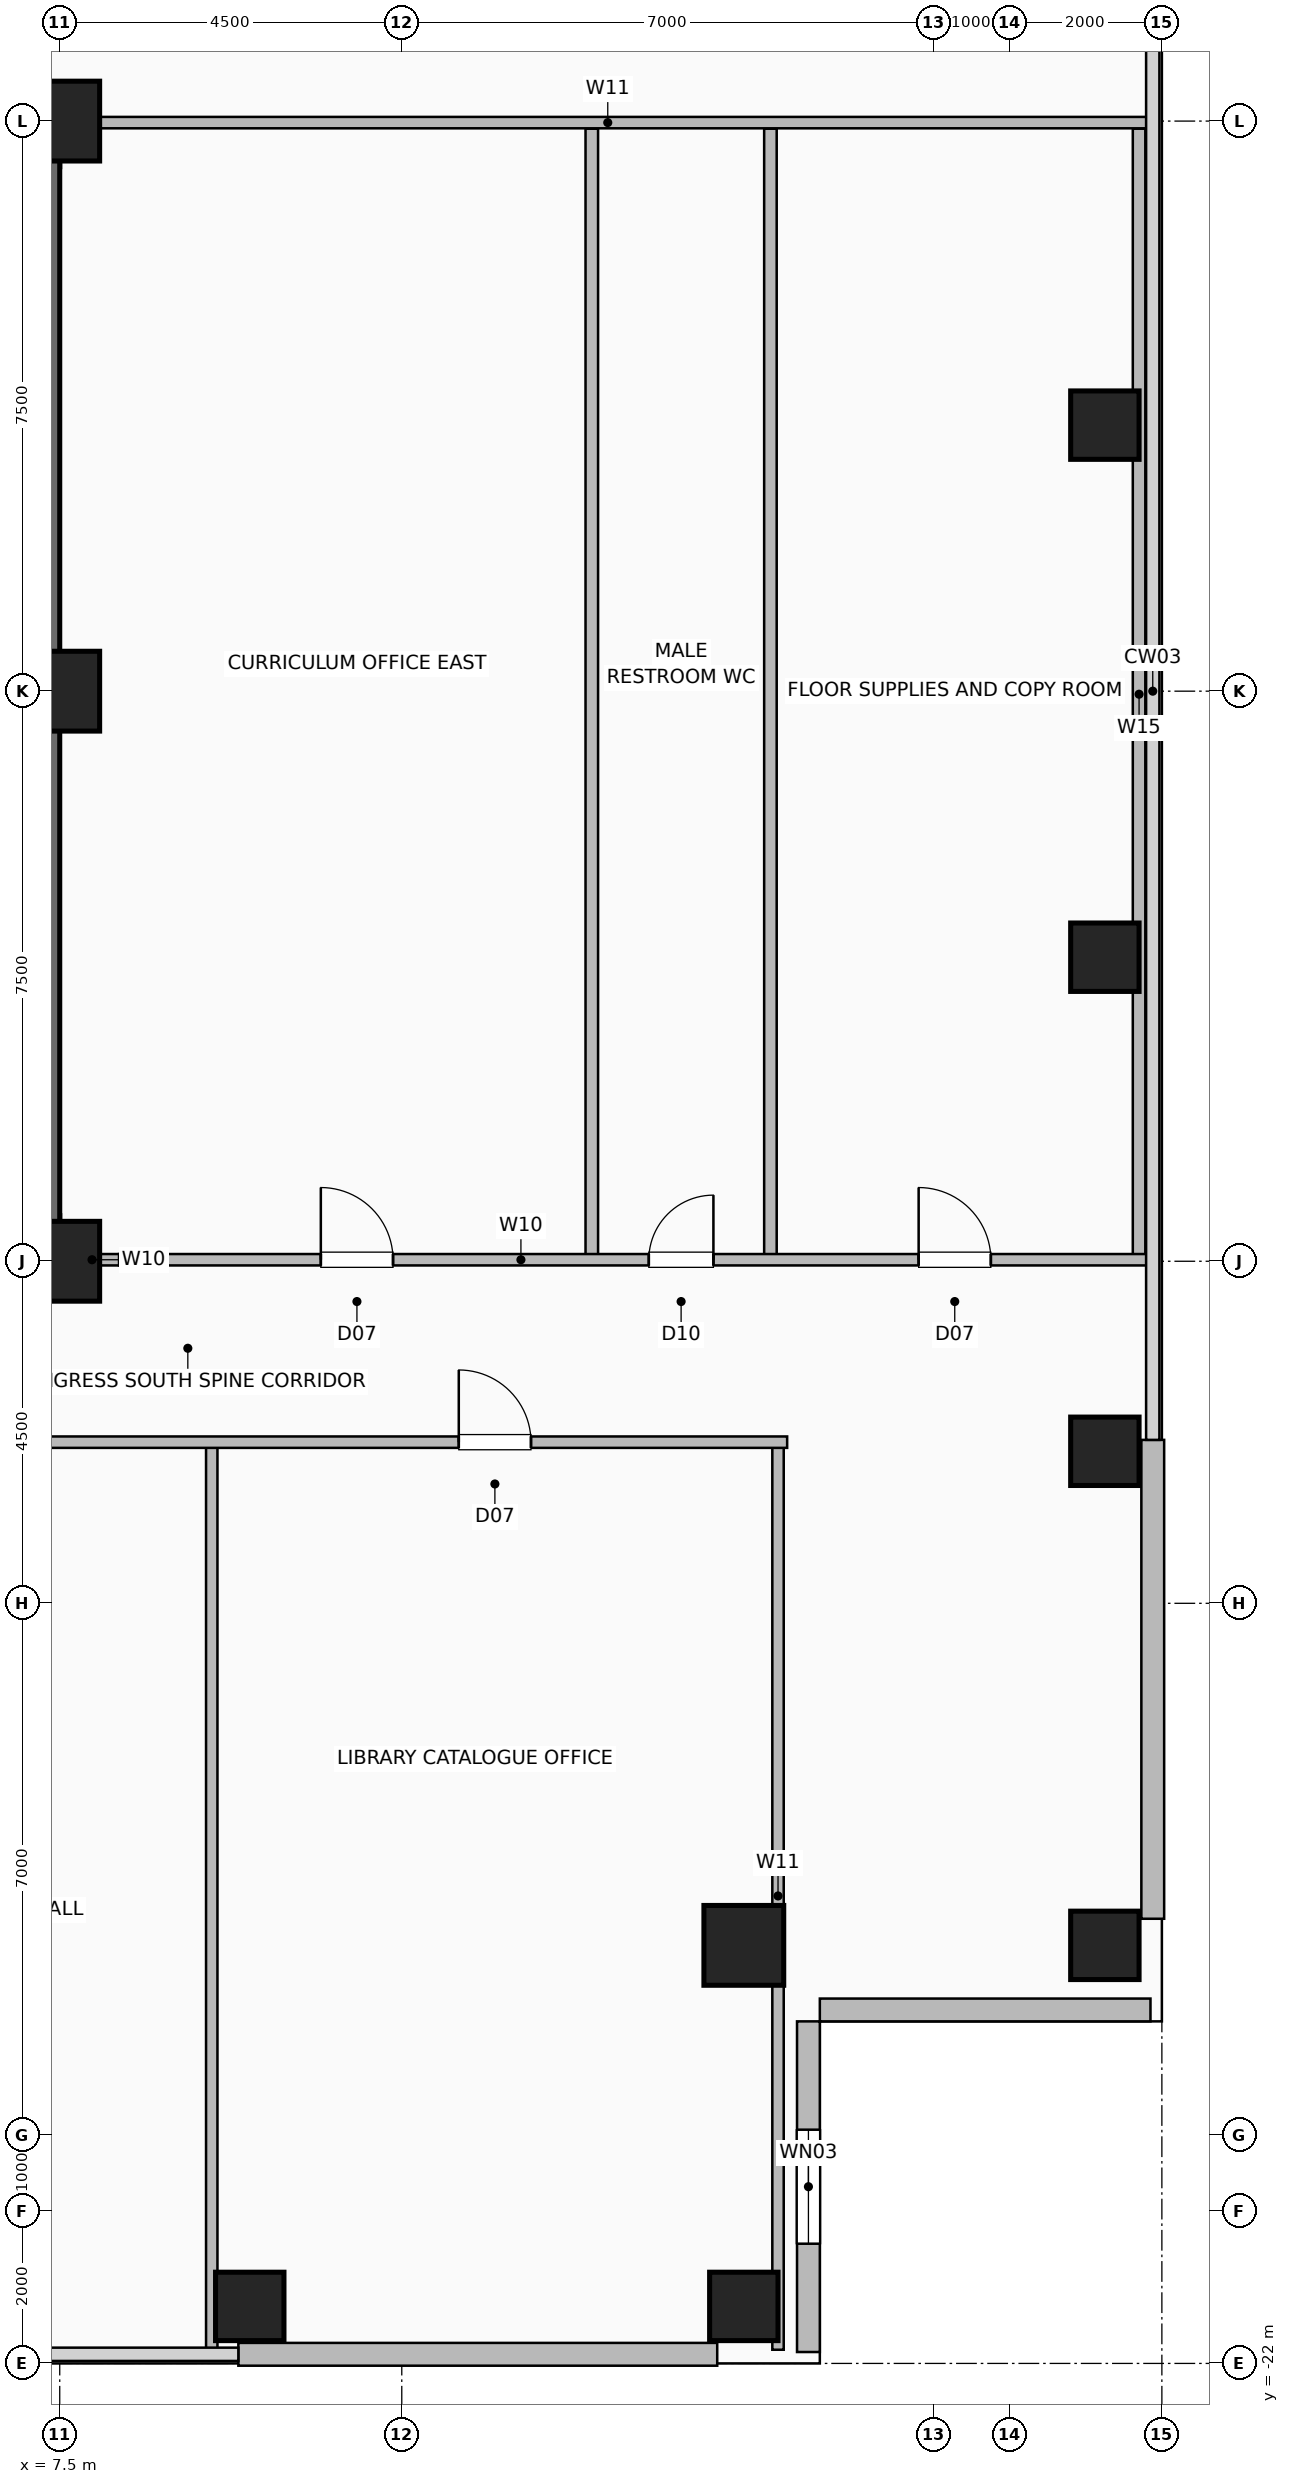
"""IFC4 building model, lengths in metres.
Left out: names, types, materials, properties, quantities, classifications, styles, units other than length and angle.
Written with IfcOpenShell. Run it as: python <this file> out.ifc"""

import sys

from ifc_helpers import new_model, si_unit, direction, frame, frame_2d, origin, origin_2d, place, context, subcontext, project, spatial, rectangle, hollow_rectangle, extrude, element, fill, save


model = new_model("IFC4")
c1 = context("Model", 3, precision=1e-05, world=origin(), true_north=direction((0.0, 1.0)))
c2 = subcontext(c1, "Body", "Model", "MODEL_VIEW")
j1 = project(units=[si_unit("LENGTHUNIT", "METRE"), si_unit("PLANEANGLEUNIT", "RADIAN")], contexts=[c1])
p1 = place(None, origin())
s1 = spatial("IfcSite", under=j1, at=p1, CompositionType="ELEMENT")
p2 = place(p1, origin())
s2 = spatial("IfcBuilding", under=s1, at=p2, CompositionType="ELEMENT")
p3 = place(p2, frame((0.0, 0.0, 133.6)))
s3 = spatial("IfcBuildingStorey", under=s2, at=p3, CompositionType="ELEMENT", Elevation=133.6)
for number, where, z_axis, x_axis in (
    (1, (7.5, -7.5, 0.0), (0.0, 0.0, 1.0), (1.0, 0.0, 0.0)),
    (2, (7.5, 0.0, 0.0), (0.0, 0.0, 1.0), (1.0, 0.0, 0.0)),
    (3, (7.5, 7.5, 0.0), (0.0, 0.0, 1.0), (1.0, 0.0, 0.0)),
):
    element("IfcColumn", number, at=place(p3, frame(where, z_axis=z_axis, x_axis=x_axis)), inside=s3, PredefinedType="COLUMN", context=c2, shape_type="SweptSolid", body=[
        extrude(hollow_rectangle(XDim=1.05, YDim=1.05, WallThickness=0.05, at=origin_2d()), origin(), (0.0, 0.0, 1.0), 3.6),
    ])
for number, where, z_axis, x_axis in (
    (4, (21.25, -16.5, 0.0), (0.0, 0.0, 1.0), (1.0, 0.0, 0.0)),
    (5, (21.25, -10.0, 0.0), (0.0, 0.0, 1.0), (1.0, 0.0, 0.0)),
    (6, (21.25, -3.5, 0.0), (0.0, 0.0, 1.0), (1.0, 0.0, 0.0)),
    (7, (21.25, 3.5, 0.0), (0.0, 0.0, 1.0), (1.0, 0.0, 0.0)),
    (8, (10.0, -21.25, 0.0), (0.0, 0.0, 1.0), (1.0, 0.0, 0.0)),
    (9, (16.5, -21.25, 0.0), (0.0, 0.0, 1.0), (1.0, 0.0, 0.0)),
):
    element("IfcColumn", number, at=place(p3, frame(where, z_axis=z_axis, x_axis=x_axis)), inside=s3, PredefinedType="COLUMN", context=c2, shape_type="SweptSolid", body=[
        extrude(hollow_rectangle(XDim=0.9, YDim=0.9, WallThickness=0.045, at=origin_2d()), origin(), (0.0, 0.0, 1.0), 3.6),
    ])
p4 = place(p3, frame((16.5, -16.5, 0.0), z_axis=(0.0, 0.0, 1.0), x_axis=(1.0, 0.0, 0.0)))
e10 = element("IfcColumn", 10, at=p4, inside=s3, PredefinedType="COLUMN", context=c2, shape_type="SweptSolid", body=[
    extrude(hollow_rectangle(XDim=1.05, YDim=1.05, WallThickness=0.05, at=origin_2d()), origin(), (0.0, 0.0, 1.0), 3.6),
])
for number, where, z_axis, x_axis in (
    (11, (9.85, -21.88, 0.0), (0.0, 0.0, 1.0), (1.0, 0.0, 0.0)),
    (12, (21.88, -16.15, 0.0), (0.0, 0.0, 1.0), (0.0, 1.0, 0.0)),
):
    element("IfcWall", number, at=place(p3, frame(where, z_axis=z_axis, x_axis=x_axis)), inside=s3, PredefinedType="SOLIDWALL", context=c2, shape_type="SweptSolid", body=[
        extrude(rectangle(XDim=6.3, YDim=0.3, at=frame_2d((3.15, 0.0))), origin(), (0.0, 0.0, 1.0), 3.36),
    ])
p5 = place(p3, frame((17.35, -21.85, 0.0), z_axis=(0.0, 0.0, 1.0), x_axis=(0.0, 1.0, 0.0)))
e13 = element("IfcWall", 13, at=p5, inside=s3, PredefinedType="SOLIDWALL", context=c2, shape_type="SweptSolid", body=[
    extrude(rectangle(XDim=4.35, YDim=0.3, at=frame_2d((2.175, 0.0))), origin(), (0.0, 0.0, 1.0), 3.36),
])
p6 = place(p5, frame((1.425, 0.0, 0.9)))
e14 = element("IfcOpeningElement", 14, at=p6, cuts=e13, PredefinedType="OPENING", context=c2, shape_type="SweptSolid", body=[
    extrude(rectangle(XDim=1.5, YDim=1.8, at=frame_2d((0.75, 0.9))), frame((0.0, 0.16, 0.0), z_axis=(0.0, -1.0, 0.0), x_axis=(1.0, 0.0, 0.0)), (0.0, 0.0, 1.0), 0.32),
])
p7 = place(p3, frame((21.85, -17.35, 0.0), z_axis=(0.0, 0.0, 1.0), x_axis=(-1.0, 0.0, 0.0)))
e15 = element("IfcWall", 15, at=p7, inside=s3, PredefinedType="SOLIDWALL", context=c2, shape_type="SweptSolid", body=[
    extrude(rectangle(XDim=4.35, YDim=0.3, at=frame_2d((2.175, 0.0))), origin(), (0.0, 0.0, 1.0), 3.36),
])
p8 = place(p3, frame((-7.5, -7.2, 0.0), z_axis=(0.0, 0.0, 1.0), x_axis=(1.0, 0.0, 0.0)))
e16 = element("IfcWall", 16, at=p8, inside=s3, PredefinedType="SHEAR", context=c2, shape_type="SweptSolid", body=[
    extrude(rectangle(XDim=15.0, YDim=0.6, at=frame_2d((7.5, 0.0))), origin(), (0.0, 0.0, 1.0), 3.36),
])
p9 = place(p8, frame((1.55, 0.0, 0.0)))
e17 = element("IfcOpeningElement", 17, at=p9, cuts=e16, PredefinedType="OPENING", context=c2, shape_type="SweptSolid", body=[
    extrude(rectangle(XDim=1.05, YDim=2.08, at=frame_2d((0.525, 1.04))), frame((0.0, 0.31, 0.0), z_axis=(0.0, -1.0, 0.0), x_axis=(1.0, 0.0, 0.0)), (0.0, 0.0, 1.0), 0.62),
])
p10 = place(p8, frame((12.4, 0.0, 0.0)))
e18 = element("IfcOpeningElement", 18, at=p10, cuts=e16, PredefinedType="OPENING", context=c2, shape_type="SweptSolid", body=[
    extrude(rectangle(XDim=1.05, YDim=2.08, at=frame_2d((0.525, 1.04))), frame((0.0, 0.31, 0.0), z_axis=(0.0, -1.0, 0.0), x_axis=(1.0, 0.0, 0.0)), (0.0, 0.0, 1.0), 0.62),
])
p11 = place(p8, frame((5.2, 0.0, 0.0)))
e19 = element("IfcOpeningElement", 19, at=p11, cuts=e16, PredefinedType="OPENING", context=c2, shape_type="SweptSolid", body=[
    extrude(rectangle(XDim=1.0, YDim=2.08, at=frame_2d((0.5, 1.04))), frame((0.0, 0.31, 0.0), z_axis=(0.0, -1.0, 0.0), x_axis=(1.0, 0.0, 0.0)), (0.0, 0.0, 1.0), 0.62),
])
p12 = place(p8, frame((8.65, 0.0, 0.0)))
e20 = element("IfcOpeningElement", 20, at=p12, cuts=e16, PredefinedType="OPENING", context=c2, shape_type="SweptSolid", body=[
    extrude(rectangle(XDim=1.0, YDim=2.08, at=frame_2d((0.5, 1.04))), frame((0.0, 0.31, 0.0), z_axis=(0.0, -1.0, 0.0), x_axis=(1.0, 0.0, 0.0)), (0.0, 0.0, 1.0), 0.62),
])
for number, where, z_axis, x_axis in (
    (21, (-7.5, 7.2, 0.0), (0.0, 0.0, 1.0), (1.0, 0.0, 0.0)),
    (22, (7.2, -7.5, 0.0), (0.0, 0.0, 1.0), (0.0, 1.0, 0.0)),
):
    element("IfcWall", number, at=place(p3, frame(where, z_axis=z_axis, x_axis=x_axis)), inside=s3, PredefinedType="SHEAR", context=c2, shape_type="SweptSolid", body=[
        extrude(rectangle(XDim=15.0, YDim=0.6, at=frame_2d((7.5, 0.0))), origin(), (0.0, 0.0, 1.0), 3.36),
    ])
for number, where, z_axis, x_axis in (
    (23, (9.5, -21.82, 0.0), (0.0, 0.0, 1.0), (0.0, 1.0, 0.0)),
    (24, (16.95, -21.82, 0.0), (0.0, 0.0, 1.0), (0.0, 1.0, 0.0)),
):
    element("IfcWall", number, at=place(p3, frame(where, z_axis=z_axis, x_axis=x_axis)), inside=s3, PredefinedType="PARTITIONING", context=c2, shape_type="SweptSolid", body=[
        extrude(rectangle(XDim=11.94, YDim=0.15, at=frame_2d((5.97, 0.0))), origin(), (0.0, 0.0, 1.0), 3.36),
    ])
p13 = place(p3, frame((-17.07, -9.88, 0.0), z_axis=(0.0, 0.0, 1.0), x_axis=(1.0, 0.0, 0.0)))
e25 = element("IfcWall", 25, at=p13, inside=s3, PredefinedType="PARTITIONING", context=c2, shape_type="SweptSolid", body=[
    extrude(rectangle(XDim=34.14, YDim=0.15, at=frame_2d((17.07, 0.0))), origin(), (0.0, 0.0, 1.0), 3.36),
])
p14 = place(p13, frame((3.695, 0.0, 0.0)))
e26 = element("IfcOpeningElement", 26, at=p14, cuts=e25, PredefinedType="OPENING", context=c2, shape_type="SweptSolid", body=[
    extrude(rectangle(XDim=1.8, YDim=2.08, at=frame_2d((0.9, 1.04))), frame((0.0, 0.085, 0.0), z_axis=(0.0, -1.0, 0.0), x_axis=(1.0, 0.0, 0.0)), (0.0, 0.0, 1.0), 0.17),
])
p15 = place(p13, frame((12.92, 0.0, 0.0)))
e27 = element("IfcOpeningElement", 27, at=p15, cuts=e25, PredefinedType="OPENING", context=c2, shape_type="SweptSolid", body=[
    extrude(rectangle(XDim=1.8, YDim=2.08, at=frame_2d((0.9, 1.04))), frame((0.0, 0.085, 0.0), z_axis=(0.0, -1.0, 0.0), x_axis=(1.0, 0.0, 0.0)), (0.0, 0.0, 1.0), 0.17),
])
p16 = place(p13, frame((21.67, 0.0, 0.0)))
e28 = element("IfcOpeningElement", 28, at=p16, cuts=e25, PredefinedType="OPENING", context=c2, shape_type="SweptSolid", body=[
    extrude(rectangle(XDim=1.8, YDim=2.08, at=frame_2d((0.9, 1.04))), frame((0.0, 0.085, 0.0), z_axis=(0.0, -1.0, 0.0), x_axis=(1.0, 0.0, 0.0)), (0.0, 0.0, 1.0), 0.17),
])
p17 = place(p13, frame((29.82, 0.0, 0.0)))
e29 = element("IfcOpeningElement", 29, at=p17, cuts=e25, PredefinedType="OPENING", context=c2, shape_type="SweptSolid", body=[
    extrude(rectangle(XDim=0.95, YDim=2.06, at=frame_2d((0.475, 1.03))), frame((0.0, 0.085, 0.0), z_axis=(0.0, -1.0, 0.0), x_axis=(1.0, 0.0, 0.0)), (0.0, 0.0, 1.0), 0.17),
])
p18 = place(p3, frame((7.45, -7.48, 0.0), z_axis=(0.0, 0.0, 1.0), x_axis=(1.0, 0.0, 0.0)))
e30 = element("IfcWall", 30, at=p18, inside=s3, PredefinedType="PARTITIONING", context=c2, shape_type="SweptSolid", body=[
    extrude(rectangle(XDim=0.95, YDim=0.15, at=frame_2d((0.475, 0.0))), origin(), (0.0, 0.0, 1.0), 3.36),
])
for number, where, z_axis, x_axis in (
    (31, (16.85, -7.48, 0.0), (0.0, 0.0, 1.0), (0.0, 1.0, 0.0)),
    (32, (14.5, -7.48, 0.0), (0.0, 0.0, 1.0), (0.0, 1.0, 0.0)),
    (33, (21.7, -7.48, 0.0), (0.0, 0.0, 1.0), (0.0, 1.0, 0.0)),
):
    element("IfcWall", number, at=place(p3, frame(where, z_axis=z_axis, x_axis=x_axis)), inside=s3, PredefinedType="PLUMBINGWALL", context=c2, shape_type="SweptSolid", body=[
        extrude(rectangle(XDim=14.88, YDim=0.165, at=frame_2d((7.44, 0.0))), origin(), (0.0, 0.0, 1.0), 3.36),
    ])
p19 = place(p3, frame((8.28, -7.48, 0.0), z_axis=(0.0, 0.0, 1.0), x_axis=(1.0, 0.0, 0.0)))
e34 = element("IfcWall", 34, at=p19, inside=s3, PredefinedType="PARTITIONING", context=c2, shape_type="SweptSolid", body=[
    extrude(rectangle(XDim=13.54, YDim=0.15, at=frame_2d((6.77, 0.0))), origin(), (0.0, 0.0, 1.0), 3.36),
])
p20 = place(p19, frame((2.655, 0.0, 0.0)))
e35 = element("IfcOpeningElement", 35, at=p20, cuts=e34, PredefinedType="OPENING", context=c2, shape_type="SweptSolid", body=[
    extrude(rectangle(XDim=0.95, YDim=2.06, at=frame_2d((0.475, 1.03))), frame((0.0, 0.085, 0.0), z_axis=(0.0, -1.0, 0.0), x_axis=(1.0, 0.0, 0.0)), (0.0, 0.0, 1.0), 0.17),
])
p21 = place(p19, frame((6.97, 0.0, 0.0)))
e36 = element("IfcOpeningElement", 36, at=p21, cuts=e34, PredefinedType="OPENING", context=c2, shape_type="SweptSolid", body=[
    extrude(rectangle(XDim=0.85, YDim=2.05, at=frame_2d((0.425, 1.025))), frame((0.0, 0.085, 0.0), z_axis=(0.0, -1.0, 0.0), x_axis=(1.0, 0.0, 0.0)), (0.0, 0.0, 1.0), 0.17),
])
p22 = place(p19, frame((10.52, 0.0, 0.0)))
e37 = element("IfcOpeningElement", 37, at=p22, cuts=e34, PredefinedType="OPENING", context=c2, shape_type="SweptSolid", body=[
    extrude(rectangle(XDim=0.95, YDim=2.06, at=frame_2d((0.475, 1.03))), frame((0.0, 0.085, 0.0), z_axis=(0.0, -1.0, 0.0), x_axis=(1.0, 0.0, 0.0)), (0.0, 0.0, 1.0), 0.17),
])
p23 = place(p3, frame((7.6, 7.48, 0.0), z_axis=(0.0, 0.0, 1.0), x_axis=(1.0, 0.0, 0.0)))
e38 = element("IfcWall", 38, at=p23, inside=s3, PredefinedType="PARTITIONING", context=c2, shape_type="SweptSolid", body=[
    extrude(rectangle(XDim=14.22, YDim=0.15, at=frame_2d((7.11, 0.0))), origin(), (0.0, 0.0, 1.0), 3.36),
])
p24 = place(p6, origin())
e39 = element("IfcWindow", 39, at=p24, inside=s3, PartitioningType="SINGLE_PANEL", PredefinedType="WINDOW", context=c2, shape_type="SweptSolid", body=[
    extrude(rectangle(XDim=1.5, YDim=1.8, at=frame_2d((0.75, 0.9))), frame((0.0, 0.03, 0.0), z_axis=(0.0, -1.0, 0.0), x_axis=(1.0, 0.0, 0.0)), (0.0, 0.0, 1.0), 0.06),
])
fill(e14, e39)
p25 = place(p17, origin())
e40 = element("IfcDoor", 40, at=p25, inside=s3, OperationType="SINGLE_SWING_LEFT", PredefinedType="DOOR", context=c2, shape_type="SweptSolid", body=[
    extrude(rectangle(XDim=0.95, YDim=2.06, at=frame_2d((0.475, 1.03))), frame((0.0, 0.025, 0.0), z_axis=(0.0, -1.0, 0.0), x_axis=(1.0, 0.0, 0.0)), (0.0, 0.0, 1.0), 0.05),
])
fill(e29, e40)
p26 = place(p20, origin())
e41 = element("IfcDoor", 41, at=p26, inside=s3, OperationType="SINGLE_SWING_LEFT", PredefinedType="DOOR", context=c2, shape_type="SweptSolid", body=[
    extrude(rectangle(XDim=0.95, YDim=2.06, at=frame_2d((0.475, 1.03))), frame((0.0, 0.025, 0.0), z_axis=(0.0, -1.0, 0.0), x_axis=(1.0, 0.0, 0.0)), (0.0, 0.0, 1.0), 0.05),
])
fill(e35, e41)
p27 = place(p21, origin())
e42 = element("IfcDoor", 42, at=p27, inside=s3, OperationType="SINGLE_SWING_RIGHT", PredefinedType="DOOR", context=c2, shape_type="SweptSolid", body=[
    extrude(rectangle(XDim=0.85, YDim=2.05, at=frame_2d((0.425, 1.025))), frame((0.0, 0.025, 0.0), z_axis=(0.0, -1.0, 0.0), x_axis=(1.0, 0.0, 0.0)), (0.0, 0.0, 1.0), 0.05),
])
fill(e36, e42)
p28 = place(p22, origin())
e43 = element("IfcDoor", 43, at=p28, inside=s3, OperationType="SINGLE_SWING_LEFT", PredefinedType="DOOR", context=c2, shape_type="SweptSolid", body=[
    extrude(rectangle(XDim=0.95, YDim=2.06, at=frame_2d((0.475, 1.03))), frame((0.0, 0.025, 0.0), z_axis=(0.0, -1.0, 0.0), x_axis=(1.0, 0.0, 0.0)), (0.0, 0.0, 1.0), 0.05),
])
fill(e37, e43)
save(model, sys.argv[1])
